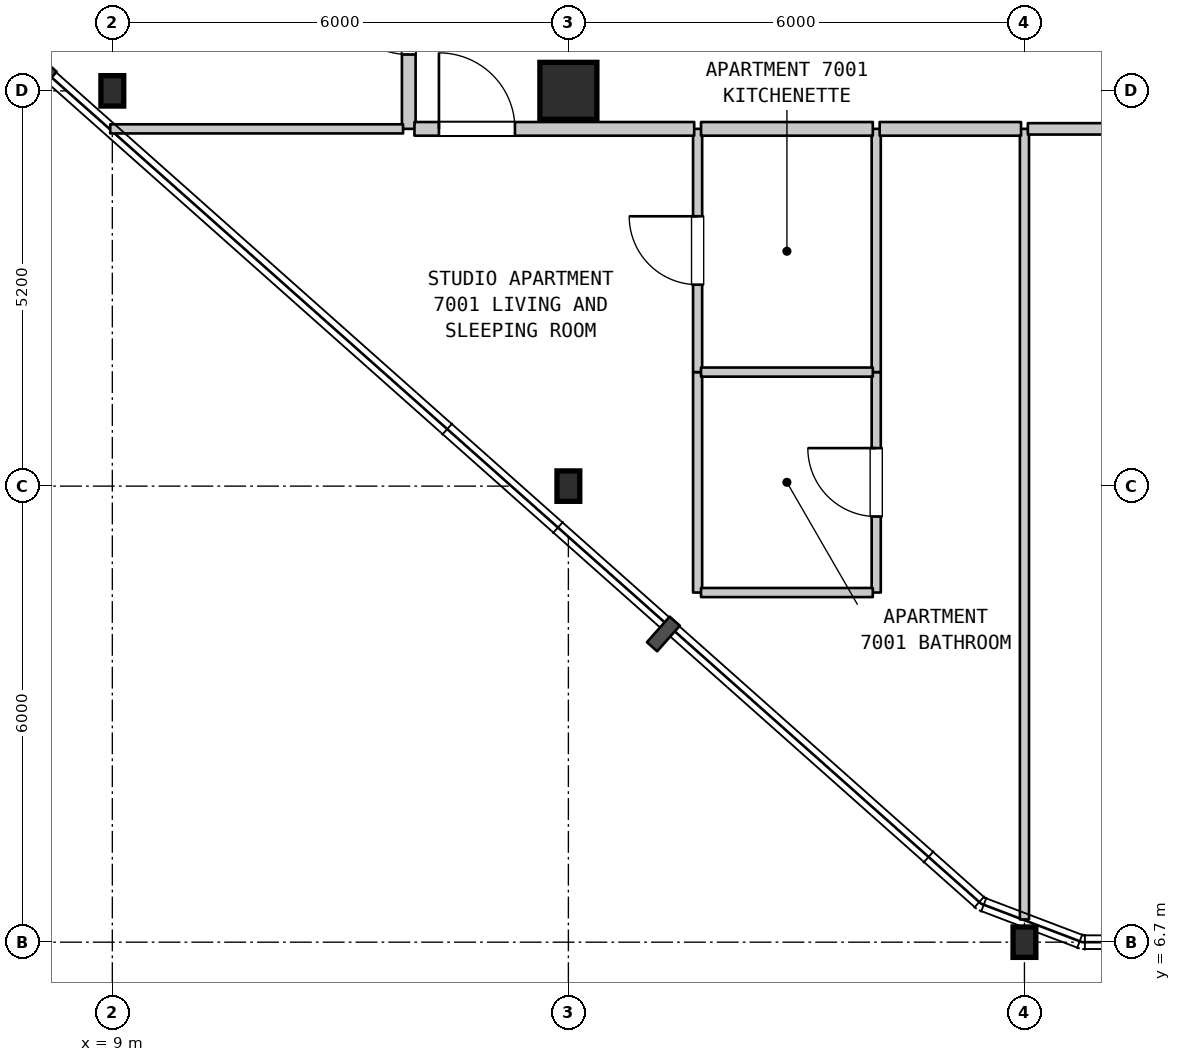
"""IFC4 building model, lengths in metres.
Left out: names, types, materials, properties, quantities, classifications, styles, units other than length and angle.
Written with IfcOpenShell. Run it as: python <this file> out.ifc"""

import sys

from ifc_helpers import new_model, si_unit, direction, frame, frame_2d, origin, origin_2d, place, context, subcontext, project, spatial, rectangle, i_section, extrude, element, fill, save


model = new_model("IFC4")
c1 = context("Model", 3, precision=1e-05, world=origin(), true_north=direction((0.0, 1.0)))
c2 = subcontext(c1, "Body", "Model", "MODEL_VIEW")
j1 = project(units=[si_unit("LENGTHUNIT", "METRE"), si_unit("PLANEANGLEUNIT", "RADIAN")], contexts=[c1])
p1 = place(None, origin())
s1 = spatial("IfcSite", under=j1, at=p1, CompositionType="ELEMENT")
p2 = place(p1, origin())
s2 = spatial("IfcBuilding", under=s1, at=p2, CompositionType="ELEMENT")
p3 = place(p2, frame((0.0, 0.0, 280.6)))
s3 = spatial("IfcBuildingStorey", under=s2, at=p3, CompositionType="ELEMENT", Elevation=280.6)
for number, where, z_axis, x_axis in (
    (1, (9.0, 17.9, 0.0), (0.0, 0.0, 1.0), (1.0, 0.0, 0.0)),
    (2, (15.0, 12.7, 0.0), (0.0, 0.0, 1.0), (1.0, 0.0, 0.0)),
):
    element("IfcColumn", number, at=place(p3, frame(where, z_axis=z_axis, x_axis=x_axis)), inside=s3, PredefinedType="COLUMN", context=c2, shape_type="SweptSolid", body=[
        extrude(i_section(OverallWidth=0.3, OverallDepth=0.4, WebThickness=0.013, FlangeThickness=0.024, FilletRadius=0.027, at=origin_2d()), origin(), (0.0, 0.0, 1.0), 3.7),
    ])
p4 = place(p3, frame((15.0, 17.9, 0.0), z_axis=(0.0, 0.0, 1.0), x_axis=(1.0, 0.0, 0.0)))
e3 = element("IfcColumn", 3, at=p4, inside=s3, PredefinedType="COLUMN", context=c2, shape_type="SweptSolid", body=[
    extrude(rectangle(XDim=0.75, YDim=0.75, at=origin_2d()), origin(), (0.0, 0.0, 1.0), 3.7),
])
p5 = place(p3, frame((21.0, 6.7, 0.0), z_axis=(0.0, 0.0, 1.0), x_axis=(1.0, 0.0, 0.0)))
e4 = element("IfcColumn", 4, at=p5, inside=s3, PredefinedType="COLUMN", context=c2, shape_type="SweptSolid", body=[
    extrude(i_section(OverallWidth=0.3, OverallDepth=0.4, WebThickness=0.013, FlangeThickness=0.024, FilletRadius=0.027, at=origin_2d()), origin(), (0.0, 0.0, 1.0), 3.7),
])
p6 = place(p3, frame((12.9, 17.4, 0.0), z_axis=(0.0, 0.0, 1.0), x_axis=(0.0, 1.0, 0.0)))
e5 = element("IfcWall", 5, at=p6, inside=s3, PredefinedType="STANDARD", context=c2, shape_type="SweptSolid", body=[
    extrude(rectangle(XDim=3.1, YDim=0.18, at=frame_2d((1.55, 0.0))), origin(), (0.0, 0.0, 1.0), 3.39),
])
p7 = place(p6, frame((0.978, 0.0, 0.0)))
e6 = element("IfcOpeningElement", 6, at=p7, cuts=e5, PredefinedType="OPENING", context=c2, shape_type="SweptSolid", body=[
    extrude(rectangle(XDim=1.0, YDim=2.15, at=frame_2d((0.5, 1.075))), frame((0.0, 0.1, 0.0), z_axis=(0.0, -1.0, 0.0), x_axis=(1.0, 0.0, 0.0)), (0.0, 0.0, 1.0), 0.2),
])
p8 = place(p3, frame((16.7, 11.3, 0.0), z_axis=(0.0, 0.0, 1.0), x_axis=(0.0, 1.0, 0.0)))
e7 = element("IfcWall", 7, at=p8, inside=s3, PredefinedType="PARTITIONING", context=c2, shape_type="SweptSolid", body=[
    extrude(rectangle(XDim=2.9, YDim=0.12, at=frame_2d((1.45, 0.0))), origin(), (0.0, 0.0, 1.0), 3.39),
])
p9 = place(p3, frame((16.7, 14.2, 0.0), z_axis=(0.0, 0.0, 1.0), x_axis=(0.0, 1.0, 0.0)))
e8 = element("IfcWall", 8, at=p9, inside=s3, PredefinedType="PARTITIONING", context=c2, shape_type="SweptSolid", body=[
    extrude(rectangle(XDim=3.2, YDim=0.12, at=frame_2d((1.6, 0.0))), origin(), (0.0, 0.0, 1.0), 3.39),
])
p10 = place(p9, frame((1.15, 0.0, 0.0)))
e9 = element("IfcOpeningElement", 9, at=p10, cuts=e8, PredefinedType="OPENING", context=c2, shape_type="SweptSolid", body=[
    extrude(rectangle(XDim=0.9, YDim=2.15, at=frame_2d((0.45, 1.075))), frame((0.0, 0.07, 0.0), z_axis=(0.0, -1.0, 0.0), x_axis=(1.0, 0.0, 0.0)), (0.0, 0.0, 1.0), 0.14),
])
p11 = place(p3, frame((19.05, 11.3, 0.0), z_axis=(0.0, 0.0, 1.0), x_axis=(0.0, 1.0, 0.0)))
e10 = element("IfcWall", 10, at=p11, inside=s3, PredefinedType="PARTITIONING", context=c2, shape_type="SweptSolid", body=[
    extrude(rectangle(XDim=2.9, YDim=0.12, at=frame_2d((1.45, 0.0))), origin(), (0.0, 0.0, 1.0), 3.39),
])
p12 = place(p11, frame((1.0, 0.0, 0.0)))
e11 = element("IfcOpeningElement", 11, at=p12, cuts=e10, PredefinedType="OPENING", context=c2, shape_type="SweptSolid", body=[
    extrude(rectangle(XDim=0.9, YDim=2.1, at=frame_2d((0.45, 1.05))), frame((0.0, 0.07, 0.0), z_axis=(0.0, -1.0, 0.0), x_axis=(1.0, 0.0, 0.0)), (0.0, 0.0, 1.0), 0.14),
])
p13 = place(p3, frame((19.05, 14.2, 0.0), z_axis=(0.0, 0.0, 1.0), x_axis=(0.0, 1.0, 0.0)))
e12 = element("IfcWall", 12, at=p13, inside=s3, PredefinedType="PARTITIONING", context=c2, shape_type="SweptSolid", body=[
    extrude(rectangle(XDim=3.2, YDim=0.12, at=frame_2d((1.6, 0.0))), origin(), (0.0, 0.0, 1.0), 3.39),
])
p14 = place(p3, frame((21.0, 6.999, 0.0), z_axis=(0.0, 0.0, 1.0), x_axis=(0.0, 1.0, 0.0)))
e13 = element("IfcWall", 13, at=p14, inside=s3, PredefinedType="PARTITIONING", context=c2, shape_type="SweptSolid", body=[
    extrude(rectangle(XDim=10.401, YDim=0.12, at=frame_2d((5.2, 0.0))), origin(), (0.0, 0.0, 1.0), 3.39),
])
for number, where, z_axis, x_axis in (
    (14, (16.745, 11.3, 0.0), (0.0, 0.0, 1.0), (1.0, 0.0, 0.0)),
    (15, (16.745, 14.2, 0.0), (0.0, 0.0, 1.0), (1.0, 0.0, 0.0)),
):
    element("IfcWall", number, at=place(p3, frame(where, z_axis=z_axis, x_axis=x_axis)), inside=s3, PredefinedType="PARTITIONING", context=c2, shape_type="SweptSolid", body=[
        extrude(rectangle(XDim=2.26, YDim=0.12, at=frame_2d((1.13, 0.0))), origin(), (0.0, 0.0, 1.0), 3.39),
    ])
p15 = place(p3, frame((8.973, 17.4, 0.0), z_axis=(0.0, 0.0, 1.0), x_axis=(1.0, 0.0, 0.0)))
e16 = element("IfcWall", 16, at=p15, inside=s3, PredefinedType="PARTITIONING", context=c2, shape_type="SweptSolid", body=[
    extrude(rectangle(XDim=3.852, YDim=0.12, at=frame_2d((1.926, 0.0))), origin(), (0.0, 0.0, 1.0), 3.39),
])
p16 = place(p3, frame((12.975, 17.4, 0.0), z_axis=(0.0, 0.0, 1.0), x_axis=(1.0, 0.0, 0.0)))
e17 = element("IfcWall", 17, at=p16, inside=s3, PredefinedType="STANDARD", context=c2, shape_type="SweptSolid", body=[
    extrude(rectangle(XDim=3.68, YDim=0.18, at=frame_2d((1.84, 0.0))), origin(), (0.0, 0.0, 1.0), 3.39),
])
p17 = place(p16, frame((0.322, 0.0, 0.0)))
e18 = element("IfcOpeningElement", 18, at=p17, cuts=e17, PredefinedType="OPENING", context=c2, shape_type="SweptSolid", body=[
    extrude(rectangle(XDim=1.0, YDim=2.15, at=frame_2d((0.5, 1.075))), frame((0.0, 0.1, 0.0), z_axis=(0.0, -1.0, 0.0), x_axis=(1.0, 0.0, 0.0)), (0.0, 0.0, 1.0), 0.2),
])
p18 = place(p3, frame((16.745, 17.4, 0.0), z_axis=(0.0, 0.0, 1.0), x_axis=(1.0, 0.0, 0.0)))
e19 = element("IfcWall", 19, at=p18, inside=s3, PredefinedType="STANDARD", context=c2, shape_type="SweptSolid", body=[
    extrude(rectangle(XDim=2.26, YDim=0.18, at=frame_2d((1.13, 0.0))), origin(), (0.0, 0.0, 1.0), 3.39),
])
p19 = place(p3, frame((19.095, 17.4, 0.0), z_axis=(0.0, 0.0, 1.0), x_axis=(1.0, 0.0, 0.0)))
e20 = element("IfcWall", 20, at=p19, inside=s3, PredefinedType="STANDARD", context=c2, shape_type="SweptSolid", body=[
    extrude(rectangle(XDim=1.86, YDim=0.18, at=frame_2d((0.93, 0.0))), origin(), (0.0, 0.0, 1.0), 3.39),
])
p20 = place(p3, frame((21.045, 17.4, 0.0), z_axis=(0.0, 0.0, 1.0), x_axis=(1.0, 0.0, 0.0)))
e21 = element("IfcWall", 21, at=p20, inside=s3, PredefinedType="STANDARD", context=c2, shape_type="SweptSolid", body=[
    extrude(rectangle(XDim=6.51, YDim=0.15, at=frame_2d((3.255, 0.0))), origin(), (0.0, 0.0, 1.0), 3.39),
])
p21 = place(p20, frame((2.755, 0.0, 0.0)))
e22 = element("IfcOpeningElement", 22, at=p21, cuts=e21, PredefinedType="OPENING", context=c2, shape_type="SweptSolid", body=[
    extrude(rectangle(XDim=1.0, YDim=2.15, at=frame_2d((0.5, 1.075))), frame((0.0, 0.085, 0.0), z_axis=(0.0, -1.0, 0.0), x_axis=(1.0, 0.0, 0.0)), (0.0, 0.0, 1.0), 0.17),
])
p22 = place(p7, origin())
e23 = element("IfcDoor", 23, at=p22, inside=s3, OperationType="SINGLE_SWING_RIGHT", PredefinedType="DOOR", context=c2, shape_type="SweptSolid", body=[
    extrude(rectangle(XDim=1.0, YDim=2.15, at=frame_2d((0.5, 1.075))), frame((0.0, 0.025, 0.0), z_axis=(0.0, -1.0, 0.0), x_axis=(1.0, 0.0, 0.0)), (0.0, 0.0, 1.0), 0.05),
])
fill(e6, e23)
p23 = place(p10, origin())
e24 = element("IfcDoor", 24, at=p23, inside=s3, OperationType="SINGLE_SWING_RIGHT", PredefinedType="DOOR", context=c2, shape_type="SweptSolid", body=[
    extrude(rectangle(XDim=0.9, YDim=2.15, at=frame_2d((0.45, 1.075))), frame((0.0, 0.025, 0.0), z_axis=(0.0, -1.0, 0.0), x_axis=(1.0, 0.0, 0.0)), (0.0, 0.0, 1.0), 0.05),
])
fill(e9, e24)
p24 = place(p12, origin())
e25 = element("IfcDoor", 25, at=p24, inside=s3, OperationType="SINGLE_SWING_RIGHT", PredefinedType="DOOR", context=c2, shape_type="SweptSolid", body=[
    extrude(rectangle(XDim=0.9, YDim=2.1, at=frame_2d((0.45, 1.05))), frame((0.0, 0.025, 0.0), z_axis=(0.0, -1.0, 0.0), x_axis=(1.0, 0.0, 0.0)), (0.0, 0.0, 1.0), 0.05),
])
fill(e11, e25)
p25 = place(p17, origin())
e26 = element("IfcDoor", 26, at=p25, inside=s3, OperationType="SINGLE_SWING_LEFT", PredefinedType="DOOR", context=c2, shape_type="SweptSolid", body=[
    extrude(rectangle(XDim=1.0, YDim=2.15, at=frame_2d((0.5, 1.075))), frame((0.0, 0.025, 0.0), z_axis=(0.0, -1.0, 0.0), x_axis=(1.0, 0.0, 0.0)), (0.0, 0.0, 1.0), 0.05),
])
fill(e18, e26)
save(model, sys.argv[1])
